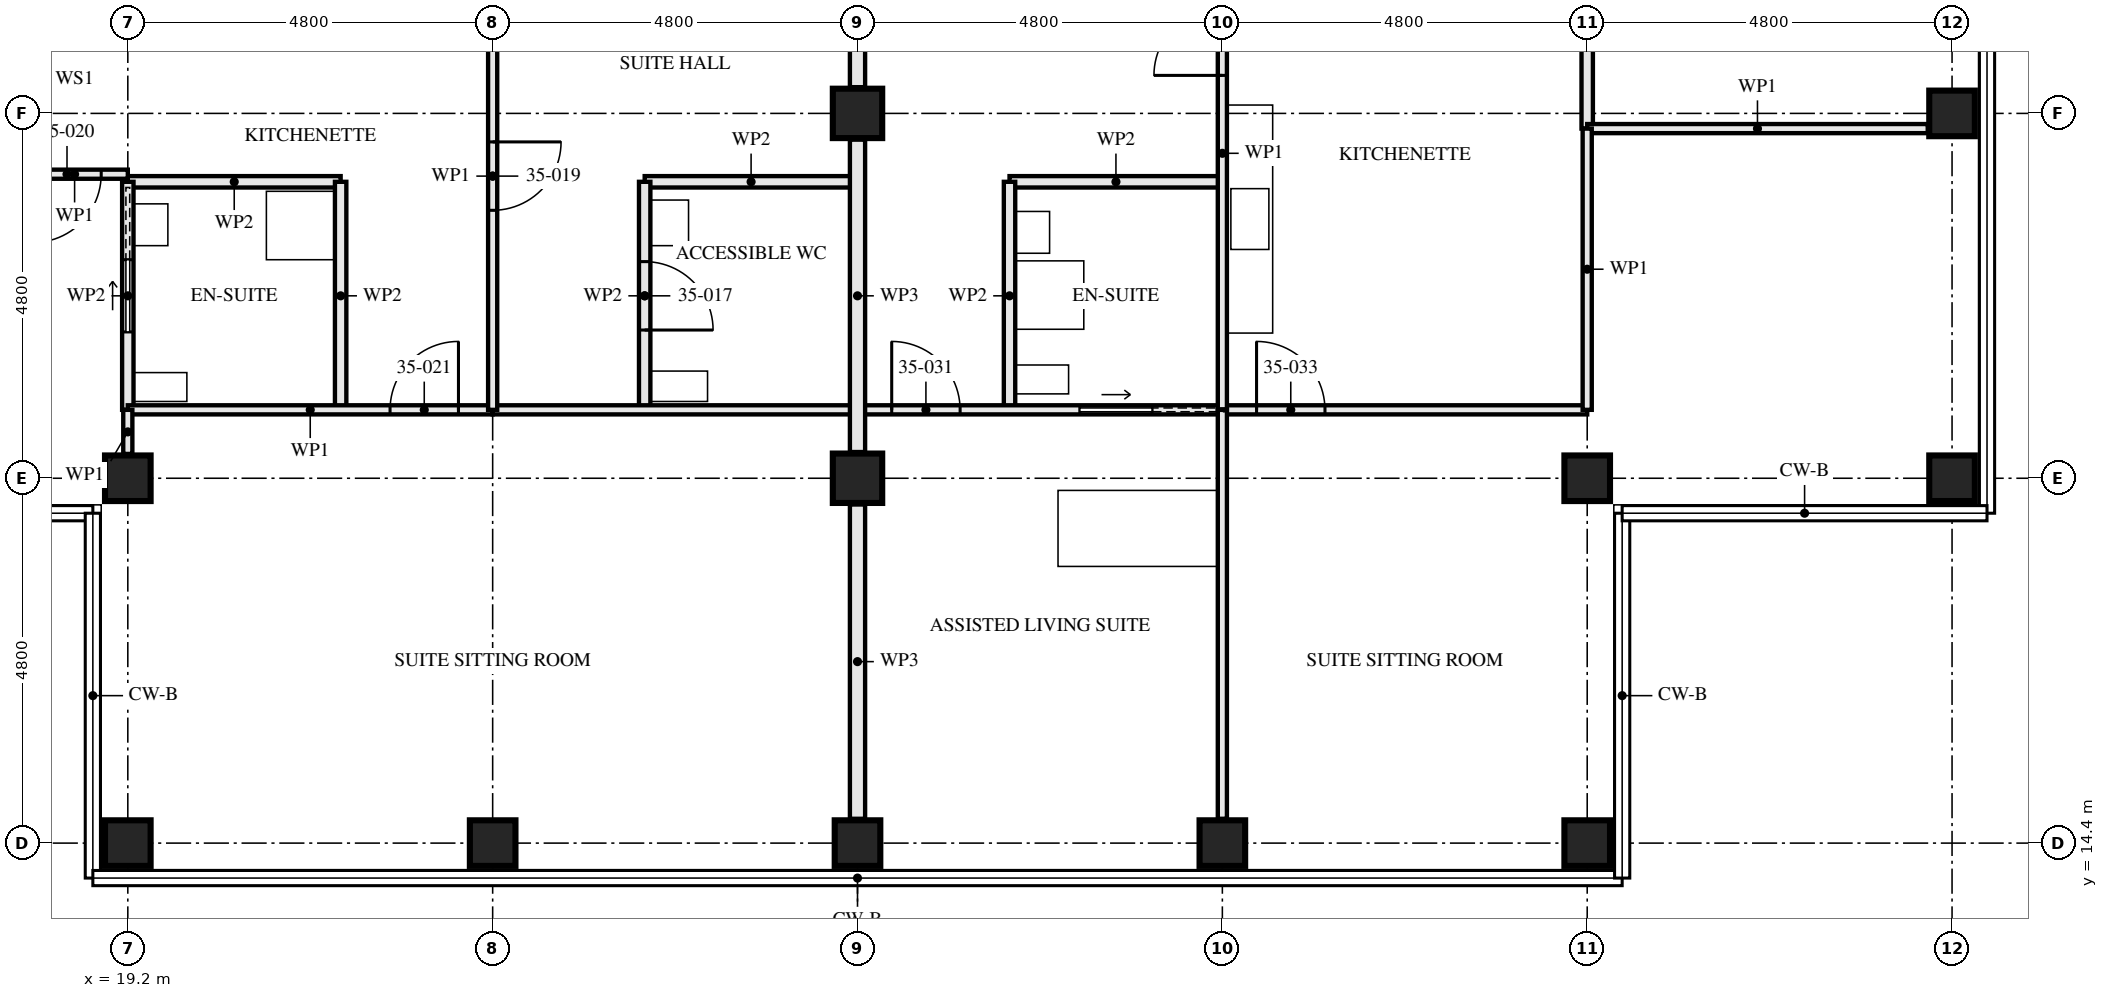
"""IFC4 building model, lengths in metres.
Left out: names, types, materials, properties, quantities, classifications, styles, units other than length and angle.
Written with IfcOpenShell. Run it as: python <this file> out.ifc"""

import sys

from ifc_helpers import new_model, si_unit, direction, frame, frame_2d, origin, origin_2d, place, context, subcontext, project, spatial, rectangle, hollow_rectangle, extrude, element, fill, save


model = new_model("IFC4")
c1 = context("Model", 3, precision=1e-05, world=origin(), true_north=direction((0.0, 1.0)))
c2 = subcontext(c1, "Body", "Model", "MODEL_VIEW")
j1 = project(units=[si_unit("LENGTHUNIT", "METRE"), si_unit("PLANEANGLEUNIT", "RADIAN")], contexts=[c1])
p1 = place(None, origin())
s1 = spatial("IfcSite", under=j1, at=p1, CompositionType="ELEMENT")
p2 = place(p1, origin())
s2 = spatial("IfcBuilding", under=s1, at=p2, CompositionType="ELEMENT")
p3 = place(p2, frame((0.0, 0.0, 129.5)))
s3 = spatial("IfcBuildingStorey", under=s2, at=p3, CompositionType="ELEMENT", Elevation=129.5)
for number, where, z_axis, x_axis in (
    (1, (19.2, 14.4, 0.0), (0.0, 0.0, 1.0), (0.0, 1.0, 0.0)),
    (2, (19.2, 19.2, 0.0), (0.0, 0.0, 1.0), (0.0, 1.0, 0.0)),
    (3, (24.0, 14.4, 0.0), (0.0, 0.0, 1.0), (0.0, 1.0, 0.0)),
    (4, (28.8, 14.4, 0.0), (0.0, 0.0, 1.0), (0.0, 1.0, 0.0)),
):
    element("IfcColumn", number, at=place(p3, frame(where, z_axis=z_axis, x_axis=x_axis)), inside=s3, PredefinedType="COLUMN", context=c2, shape_type="SweptSolid", body=[
        extrude(hollow_rectangle(XDim=0.6, YDim=0.6, WallThickness=0.08, at=origin_2d()), origin(), (0.0, 0.0, 1.0), 3.5),
    ])
for number, where, z_axis, x_axis in (
    (5, (28.8, 19.2, 0.0), (0.0, 0.0, 1.0), (1.0, 0.0, 0.0)),
    (6, (28.8, 24.0, 0.0), (0.0, 0.0, 1.0), (1.0, 0.0, 0.0)),
):
    element("IfcColumn", number, at=place(p3, frame(where, z_axis=z_axis, x_axis=x_axis)), inside=s3, PredefinedType="COLUMN", context=c2, shape_type="SweptSolid", body=[
        extrude(hollow_rectangle(XDim=0.65, YDim=0.65, WallThickness=0.05, at=origin_2d()), origin(), (0.0, 0.0, 1.0), 3.5),
    ])
for number, where, z_axis, x_axis in (
    (7, (33.6, 14.4, 0.0), (0.0, 0.0, 1.0), (0.0, 1.0, 0.0)),
    (8, (38.4, 14.4, 0.0), (0.0, 0.0, 1.0), (0.0, 1.0, 0.0)),
    (9, (38.4, 19.2, 0.0), (0.0, 0.0, 1.0), (0.0, 1.0, 0.0)),
    (10, (43.2, 19.2, 0.0), (0.0, 0.0, 1.0), (0.0, 1.0, 0.0)),
    (11, (43.2, 24.0, 0.0), (0.0, 0.0, 1.0), (1.0, 0.0, 0.0)),
):
    element("IfcColumn", number, at=place(p3, frame(where, z_axis=z_axis, x_axis=x_axis)), inside=s3, PredefinedType="COLUMN", context=c2, shape_type="SweptSolid", body=[
        extrude(hollow_rectangle(XDim=0.6, YDim=0.6, WallThickness=0.08, at=origin_2d()), origin(), (0.0, 0.0, 1.0), 3.5),
    ])
p4 = place(p3, frame((26.0, 20.1, 0.0), z_axis=(0.0, 0.0, 1.0), x_axis=(0.0, 1.0, 0.0)))
e12 = element("IfcWall", 12, at=p4, inside=s3, PredefinedType="PARTITIONING", context=c2, shape_type="SweptSolid", body=[
    extrude(rectangle(XDim=3.0, YDim=0.15, at=frame_2d((1.5, 0.0))), origin(), (0.0, 0.0, 1.0), 3.33),
])
p5 = place(p4, frame((1.05, 0.0, 0.0)))
e13 = element("IfcOpeningElement", 13, at=p5, cuts=e12, PredefinedType="OPENING", context=c2, shape_type="SweptSolid", body=[
    extrude(rectangle(XDim=0.9, YDim=2.1, at=frame_2d((0.45, 1.05))), frame((0.0, 0.085, 0.0), z_axis=(0.0, -1.0, 0.0), x_axis=(1.0, 0.0, 0.0)), (0.0, 0.0, 1.0), 0.171),
])
p6 = place(p3, frame((26.0, 23.1, 0.0), z_axis=(0.0, 0.0, 1.0), x_axis=(1.0, 0.0, 0.0)))
e14 = element("IfcWall", 14, at=p6, inside=s3, PredefinedType="PARTITIONING", context=c2, shape_type="SweptSolid", body=[
    extrude(rectangle(XDim=2.8, YDim=0.15, at=frame_2d((1.4, 0.0))), origin(), (0.0, 0.0, 1.0), 3.33),
])
p7 = place(p3, frame((19.2, 20.1, 0.0), z_axis=(0.0, 0.0, 1.0), x_axis=(0.0, 1.0, 0.0)))
e15 = element("IfcWall", 15, at=p7, inside=s3, PredefinedType="PARTITIONING", context=c2, shape_type="SweptSolid", body=[
    extrude(rectangle(XDim=3.0, YDim=0.15, at=frame_2d((1.5, 0.0))), origin(), (0.0, 0.0, 1.0), 2.55),
])
p8 = place(p7, frame((1.025, 0.0, 0.0)))
e16 = element("IfcOpeningElement", 16, at=p8, cuts=e15, PredefinedType="OPENING", context=c2, shape_type="SweptSolid", body=[
    extrude(rectangle(XDim=0.95, YDim=2.1, at=frame_2d((0.475, 1.05))), frame((0.0, 0.085, 0.0), z_axis=(0.0, -1.0, 0.0), x_axis=(1.0, 0.0, 0.0)), (0.0, 0.0, 1.0), 0.171),
])
p9 = place(p3, frame((22.0, 20.1, 0.0), z_axis=(0.0, 0.0, 1.0), x_axis=(0.0, 1.0, 0.0)))
e17 = element("IfcWall", 17, at=p9, inside=s3, PredefinedType="PARTITIONING", context=c2, shape_type="SweptSolid", body=[
    extrude(rectangle(XDim=3.0, YDim=0.15, at=frame_2d((1.5, 0.0))), origin(), (0.0, 0.0, 1.0), 3.33),
])
p10 = place(p3, frame((19.2, 23.1, 0.0), z_axis=(0.0, 0.0, 1.0), x_axis=(1.0, 0.0, 0.0)))
e18 = element("IfcWall", 18, at=p10, inside=s3, PredefinedType="PARTITIONING", context=c2, shape_type="SweptSolid", body=[
    extrude(rectangle(XDim=2.8, YDim=0.15, at=frame_2d((1.4, 0.0))), origin(), (0.0, 0.0, 1.0), 3.33),
])
p11 = place(p3, frame((24.0, 20.1, 0.0), z_axis=(0.0, 0.0, 1.0), x_axis=(0.0, 1.0, 0.0)))
e19 = element("IfcWall", 19, at=p11, inside=s3, PredefinedType="PARTITIONING", context=c2, shape_type="SweptSolid", body=[
    extrude(rectangle(XDim=6.15, YDim=0.12, at=frame_2d((3.075, 0.0))), origin(), (0.0, 0.0, 1.0), 2.55),
])
p12 = place(p11, frame((2.625, 0.0, 0.0)))
e20 = element("IfcOpeningElement", 20, at=p12, cuts=e19, PredefinedType="OPENING", context=c2, shape_type="SweptSolid", body=[
    extrude(rectangle(XDim=0.9, YDim=2.1, at=frame_2d((0.45, 1.05))), frame((0.0, 0.071, 0.0), z_axis=(0.0, -1.0, 0.0), x_axis=(1.0, 0.0, 0.0)), (0.0, 0.0, 1.0), 0.141),
])
p13 = place(p3, frame((17.8, 23.2, 0.0), z_axis=(0.0, 0.0, 1.0), x_axis=(1.0, 0.0, 0.0)))
e21 = element("IfcWall", 21, at=p13, inside=s3, PredefinedType="PARTITIONING", context=c2, shape_type="SweptSolid", body=[
    extrude(rectangle(XDim=1.4, YDim=0.12, at=frame_2d((0.7, 0.0))), origin(), (0.0, 0.0, 1.0), 3.33),
])
p14 = place(p13, frame((0.15, 0.0, 0.0)))
e22 = element("IfcOpeningElement", 22, at=p14, cuts=e21, PredefinedType="OPENING", context=c2, shape_type="SweptSolid", body=[
    extrude(rectangle(XDim=0.9, YDim=2.1, at=frame_2d((0.45, 1.05))), frame((0.0, 0.071, 0.0), z_axis=(0.0, -1.0, 0.0), x_axis=(1.0, 0.0, 0.0)), (0.0, 0.0, 1.0), 0.141),
])
p15 = place(p3, frame((19.2, 20.1, 0.0), z_axis=(0.0, 0.0, 1.0), x_axis=(1.0, 0.0, 0.0)))
e23 = element("IfcWall", 23, at=p15, inside=s3, PredefinedType="PARTITIONING", context=c2, shape_type="SweptSolid", body=[
    extrude(rectangle(XDim=4.8, YDim=0.12, at=frame_2d((2.4, 0.0))), origin(), (0.0, 0.0, 1.0), 3.33),
])
p16 = place(p15, frame((3.45, 0.0, 0.0)))
e24 = element("IfcOpeningElement", 24, at=p16, cuts=e23, PredefinedType="OPENING", context=c2, shape_type="SweptSolid", body=[
    extrude(rectangle(XDim=0.9, YDim=2.1, at=frame_2d((0.45, 1.05))), frame((0.0, 0.071, 0.0), z_axis=(0.0, -1.0, 0.0), x_axis=(1.0, 0.0, 0.0)), (0.0, 0.0, 1.0), 0.141),
])
p17 = place(p3, frame((24.0, 20.1, 0.0), z_axis=(0.0, 0.0, 1.0), x_axis=(1.0, 0.0, 0.0)))
e25 = element("IfcWall", 25, at=p17, inside=s3, PredefinedType="PARTITIONING", context=c2, shape_type="SweptSolid", body=[
    extrude(rectangle(XDim=4.8, YDim=0.12, at=frame_2d((2.4, 0.0))), origin(), (0.0, 0.0, 1.0), 3.33),
])
p18 = place(p3, frame((19.2, 19.52, 0.0), z_axis=(0.0, 0.0, 1.0), x_axis=(0.0, 1.0, 0.0)))
e26 = element("IfcWall", 26, at=p18, inside=s3, PredefinedType="PARTITIONING", context=c2, shape_type="SweptSolid", body=[
    extrude(rectangle(XDim=0.58, YDim=0.12, at=frame_2d((0.29, 0.0))), origin(), (0.0, 0.0, 1.0), 2.55),
])
p19 = place(p3, frame((30.8, 20.1, 0.0), z_axis=(0.0, 0.0, 1.0), x_axis=(0.0, 1.0, 0.0)))
e27 = element("IfcWall", 27, at=p19, inside=s3, PredefinedType="PARTITIONING", context=c2, shape_type="SweptSolid", body=[
    extrude(rectangle(XDim=3.0, YDim=0.15, at=frame_2d((1.5, 0.0))), origin(), (0.0, 0.0, 1.0), 3.33),
])
p20 = place(p3, frame((30.8, 23.1, 0.0), z_axis=(0.0, 0.0, 1.0), x_axis=(1.0, 0.0, 0.0)))
e28 = element("IfcWall", 28, at=p20, inside=s3, PredefinedType="PARTITIONING", context=c2, shape_type="SweptSolid", body=[
    extrude(rectangle(XDim=2.8, YDim=0.15, at=frame_2d((1.4, 0.0))), origin(), (0.0, 0.0, 1.0), 3.33),
])
p21 = place(p3, frame((38.4, 23.8, 0.0), z_axis=(0.0, 0.0, 1.0), x_axis=(0.0, 1.0, 0.0)))
e29 = element("IfcWall", 29, at=p21, inside=s3, PredefinedType="PARTITIONING", context=c2, shape_type="SweptSolid", body=[
    extrude(rectangle(XDim=3.0, YDim=0.15, at=frame_2d((1.5, 0.0))), origin(), (0.0, 0.0, 1.0), 2.55),
])
p22 = place(p21, frame((1.05, 0.0, 0.0)))
e30 = element("IfcOpeningElement", 30, at=p22, cuts=e29, PredefinedType="OPENING", context=c2, shape_type="SweptSolid", body=[
    extrude(rectangle(XDim=0.9, YDim=2.1, at=frame_2d((0.45, 1.05))), frame((0.0, 0.085, 0.0), z_axis=(0.0, -1.0, 0.0), x_axis=(1.0, 0.0, 0.0)), (0.0, 0.0, 1.0), 0.171),
])
p23 = place(p3, frame((33.6, 20.1, 0.0), z_axis=(0.0, 0.0, 1.0), x_axis=(0.0, 1.0, 0.0)))
e31 = element("IfcWall", 31, at=p23, inside=s3, PredefinedType="PARTITIONING", context=c2, shape_type="SweptSolid", body=[
    extrude(rectangle(XDim=6.75, YDim=0.12, at=frame_2d((3.375, 0.0))), origin(), (0.0, 0.0, 1.0), 2.55),
])
p24 = place(p23, frame((4.4, 0.0, 0.0)))
e32 = element("IfcOpeningElement", 32, at=p24, cuts=e31, PredefinedType="OPENING", context=c2, shape_type="SweptSolid", body=[
    extrude(rectangle(XDim=0.9, YDim=2.1, at=frame_2d((0.45, 1.05))), frame((0.0, 0.071, 0.0), z_axis=(0.0, -1.0, 0.0), x_axis=(1.0, 0.0, 0.0)), (0.0, 0.0, 1.0), 0.141),
])
p25 = place(p3, frame((28.8, 20.1, 0.0), z_axis=(0.0, 0.0, 1.0), x_axis=(1.0, 0.0, 0.0)))
e33 = element("IfcWall", 33, at=p25, inside=s3, PredefinedType="PARTITIONING", context=c2, shape_type="SweptSolid", body=[
    extrude(rectangle(XDim=4.8, YDim=0.12, at=frame_2d((2.4, 0.0))), origin(), (0.0, 0.0, 1.0), 3.33),
])
p26 = place(p25, frame((0.45, 0.0, 0.0)))
e34 = element("IfcOpeningElement", 34, at=p26, cuts=e33, PredefinedType="OPENING", context=c2, shape_type="SweptSolid", body=[
    extrude(rectangle(XDim=0.9, YDim=2.1, at=frame_2d((0.45, 1.05))), frame((0.0, 0.071, 0.0), z_axis=(0.0, -1.0, 0.0), x_axis=(1.0, 0.0, 0.0)), (0.0, 0.0, 1.0), 0.141),
])
p27 = place(p25, frame((2.925, 0.0, 0.0)))
e35 = element("IfcOpeningElement", 35, at=p27, cuts=e33, PredefinedType="OPENING", context=c2, shape_type="SweptSolid", body=[
    extrude(rectangle(XDim=0.95, YDim=2.1, at=frame_2d((0.475, 1.05))), frame((0.0, 0.071, 0.0), z_axis=(0.0, -1.0, 0.0), x_axis=(1.0, 0.0, 0.0)), (0.0, 0.0, 1.0), 0.141),
])
p28 = place(p3, frame((33.6, 20.1, 0.0), z_axis=(0.0, 0.0, 1.0), x_axis=(1.0, 0.0, 0.0)))
e36 = element("IfcWall", 36, at=p28, inside=s3, PredefinedType="PARTITIONING", context=c2, shape_type="SweptSolid", body=[
    extrude(rectangle(XDim=4.8, YDim=0.12, at=frame_2d((2.4, 0.0))), origin(), (0.0, 0.0, 1.0), 3.33),
])
p29 = place(p28, frame((0.45, 0.0, 0.0)))
e37 = element("IfcOpeningElement", 37, at=p29, cuts=e36, PredefinedType="OPENING", context=c2, shape_type="SweptSolid", body=[
    extrude(rectangle(XDim=0.9, YDim=2.1, at=frame_2d((0.45, 1.05))), frame((0.0, 0.071, 0.0), z_axis=(0.0, -1.0, 0.0), x_axis=(1.0, 0.0, 0.0)), (0.0, 0.0, 1.0), 0.141),
])
p30 = place(p3, frame((38.4, 23.8, 0.0), z_axis=(0.0, 0.0, 1.0), x_axis=(1.0, 0.0, 0.0)))
e38 = element("IfcWall", 38, at=p30, inside=s3, PredefinedType="PARTITIONING", context=c2, shape_type="SweptSolid", body=[
    extrude(rectangle(XDim=4.48, YDim=0.12, at=frame_2d((2.24, 0.0))), origin(), (0.0, 0.0, 1.0), 3.33),
])
p31 = place(p3, frame((33.6, 14.72, 0.0), z_axis=(0.0, 0.0, 1.0), x_axis=(0.0, 1.0, 0.0)))
e39 = element("IfcWall", 39, at=p31, inside=s3, PredefinedType="PARTITIONING", context=c2, shape_type="SweptSolid", body=[
    extrude(rectangle(XDim=5.38, YDim=0.12, at=frame_2d((2.69, 0.0))), origin(), (0.0, 0.0, 1.0), 2.55),
])
p32 = place(p3, frame((38.4, 20.1, 0.0), z_axis=(0.0, 0.0, 1.0), x_axis=(0.0, 1.0, 0.0)))
e40 = element("IfcWall", 40, at=p32, inside=s3, PredefinedType="PARTITIONING", context=c2, shape_type="SweptSolid", body=[
    extrude(rectangle(XDim=3.7, YDim=0.12, at=frame_2d((1.85, 0.0))), origin(), (0.0, 0.0, 1.0), 3.33),
])
p33 = place(p3, frame((28.8, 14.72, 0.0), z_axis=(0.0, 0.0, 1.0), x_axis=(0.0, 1.0, 0.0)))
e41 = element("IfcWall", 41, at=p33, inside=s3, PredefinedType="PARTITIONING", context=c2, shape_type="SweptSolid", body=[
    extrude(rectangle(XDim=4.135, YDim=0.2, at=frame_2d((2.067, 0.0))), origin(), (0.0, 0.0, 1.0), 2.32),
])
p34 = place(p3, frame((28.8, 19.545, 0.0), z_axis=(0.0, 0.0, 1.0), x_axis=(0.0, 1.0, 0.0)))
e42 = element("IfcWall", 42, at=p34, inside=s3, PredefinedType="PARTITIONING", context=c2, shape_type="SweptSolid", body=[
    extrude(rectangle(XDim=4.11, YDim=0.2, at=frame_2d((2.055, 0.0))), origin(), (0.0, 0.0, 1.0), 2.32),
])
p35 = place(p3, frame((28.8, 24.345, 0.0), z_axis=(0.0, 0.0, 1.0), x_axis=(0.0, 1.0, 0.0)))
e43 = element("IfcWall", 43, at=p35, inside=s3, PredefinedType="PARTITIONING", context=c2, shape_type="SweptSolid", body=[
    extrude(rectangle(XDim=2.555, YDim=0.2, at=frame_2d((1.277, 0.0))), origin(), (0.0, 0.0, 1.0), 2.32),
])
p36 = place(p5, frame((0.9, 0.0, 0.0), z_axis=(0.0, 0.0, 1.0), x_axis=(-1.0, 0.0, 0.0)))
e44 = element("IfcDoor", 44, at=p36, inside=s3, OperationType="SINGLE_SWING_LEFT", PredefinedType="DOOR", context=c2, shape_type="SweptSolid", body=[
    extrude(rectangle(XDim=0.9, YDim=2.1, at=frame_2d((0.45, 1.05))), frame((0.0, 0.022, 0.0), z_axis=(0.0, -1.0, 0.0), x_axis=(1.0, 0.0, 0.0)), (0.0, 0.0, 1.0), 0.044),
])
fill(e13, e44)
p37 = place(p8, origin())
e45 = element("IfcDoor", 45, at=p37, inside=s3, OperationType="SLIDING_TO_LEFT", PredefinedType="DOOR", context=c2, shape_type="SweptSolid", body=[
    extrude(rectangle(XDim=0.95, YDim=2.1, at=frame_2d((0.475, 1.05))), frame((0.0, 0.022, 0.0), z_axis=(0.0, -1.0, 0.0), x_axis=(1.0, 0.0, 0.0)), (0.0, 0.0, 1.0), 0.044),
])
fill(e16, e45)
p38 = place(p12, frame((0.9, 0.0, 0.0), z_axis=(0.0, 0.0, 1.0), x_axis=(-1.0, 0.0, 0.0)))
e46 = element("IfcDoor", 46, at=p38, inside=s3, OperationType="SINGLE_SWING_RIGHT", PredefinedType="DOOR", context=c2, shape_type="SweptSolid", body=[
    extrude(rectangle(XDim=0.9, YDim=2.1, at=frame_2d((0.45, 1.05))), frame((0.0, 0.022, 0.0), z_axis=(0.0, -1.0, 0.0), x_axis=(1.0, 0.0, 0.0)), (0.0, 0.0, 1.0), 0.044),
])
fill(e20, e46)
p39 = place(p14, frame((0.9, 0.0, 0.0), z_axis=(0.0, 0.0, 1.0), x_axis=(-1.0, 0.0, 0.0)))
e47 = element("IfcDoor", 47, at=p39, inside=s3, OperationType="SINGLE_SWING_LEFT", PredefinedType="DOOR", context=c2, shape_type="SweptSolid", body=[
    extrude(rectangle(XDim=0.9, YDim=2.1, at=frame_2d((0.45, 1.05))), frame((0.0, 0.022, 0.0), z_axis=(0.0, -1.0, 0.0), x_axis=(1.0, 0.0, 0.0)), (0.0, 0.0, 1.0), 0.044),
])
fill(e22, e47)
p40 = place(p16, origin())
e48 = element("IfcDoor", 48, at=p40, inside=s3, OperationType="SINGLE_SWING_LEFT", PredefinedType="DOOR", context=c2, shape_type="SweptSolid", body=[
    extrude(rectangle(XDim=0.9, YDim=2.1, at=frame_2d((0.45, 1.05))), frame((0.0, 0.022, 0.0), z_axis=(0.0, -1.0, 0.0), x_axis=(1.0, 0.0, 0.0)), (0.0, 0.0, 1.0), 0.044),
])
fill(e24, e48)
p41 = place(p24, origin())
e49 = element("IfcDoor", 49, at=p41, inside=s3, OperationType="SINGLE_SWING_RIGHT", PredefinedType="DOOR", context=c2, shape_type="SweptSolid", body=[
    extrude(rectangle(XDim=0.9, YDim=2.1, at=frame_2d((0.45, 1.05))), frame((0.0, 0.022, 0.0), z_axis=(0.0, -1.0, 0.0), x_axis=(1.0, 0.0, 0.0)), (0.0, 0.0, 1.0), 0.044),
])
fill(e32, e49)
p42 = place(p26, origin())
e50 = element("IfcDoor", 50, at=p42, inside=s3, OperationType="SINGLE_SWING_RIGHT", PredefinedType="DOOR", context=c2, shape_type="SweptSolid", body=[
    extrude(rectangle(XDim=0.9, YDim=2.1, at=frame_2d((0.45, 1.05))), frame((0.0, 0.022, 0.0), z_axis=(0.0, -1.0, 0.0), x_axis=(1.0, 0.0, 0.0)), (0.0, 0.0, 1.0), 0.044),
])
fill(e34, e50)
p43 = place(p27, origin())
e51 = element("IfcDoor", 51, at=p43, inside=s3, OperationType="SLIDING_TO_LEFT", PredefinedType="DOOR", context=c2, shape_type="SweptSolid", body=[
    extrude(rectangle(XDim=0.95, YDim=2.1, at=frame_2d((0.475, 1.05))), frame((0.0, 0.022, 0.0), z_axis=(0.0, -1.0, 0.0), x_axis=(1.0, 0.0, 0.0)), (0.0, 0.0, 1.0), 0.044),
])
fill(e35, e51)
p44 = place(p29, origin())
e52 = element("IfcDoor", 52, at=p44, inside=s3, OperationType="SINGLE_SWING_RIGHT", PredefinedType="DOOR", context=c2, shape_type="SweptSolid", body=[
    extrude(rectangle(XDim=0.9, YDim=2.1, at=frame_2d((0.45, 1.05))), frame((0.0, 0.022, 0.0), z_axis=(0.0, -1.0, 0.0), x_axis=(1.0, 0.0, 0.0)), (0.0, 0.0, 1.0), 0.044),
])
fill(e37, e52)
save(model, sys.argv[1])
